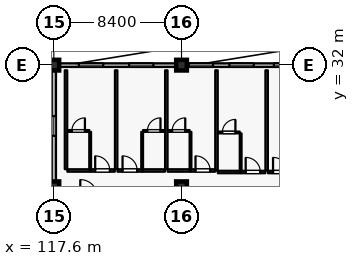
"""IFC4 building model, lengths in metres.
Left out: names, types, materials, properties, quantities, classifications, styles, units other than length and angle.
Written with IfcOpenShell. Run it as: python <this file> out.ifc"""

import sys

from ifc_helpers import new_model, si_unit, direction, frame, frame_2d, origin, origin_2d, place, context, subcontext, project, spatial, rectangle, extrude, element, fill, save


model = new_model("IFC4")
c1 = context("Model", 3, precision=1e-05, world=origin(), true_north=direction((0.0, 1.0)))
c2 = subcontext(c1, "Body", "Model", "MODEL_VIEW")
j1 = project(units=[si_unit("LENGTHUNIT", "METRE"), si_unit("PLANEANGLEUNIT", "RADIAN")], contexts=[c1])
p1 = place(None, origin())
s1 = spatial("IfcSite", under=j1, at=p1, CompositionType="ELEMENT")
p2 = place(p1, origin())
s2 = spatial("IfcBuilding", under=s1, at=p2, CompositionType="ELEMENT")
p3 = place(p2, frame((0.0, 0.0, 28.8)))
s3 = spatial("IfcBuildingStorey", under=s2, at=p3, CompositionType="ELEMENT", Elevation=28.8)
for number, where, z_axis, x_axis in (
    (1, (117.6, 32.0, 0.0), (0.0, 0.0, 1.0), (1.0, 0.0, 0.0)),
    (2, (126.0, 32.0, 0.0), (0.0, 0.0, 1.0), (1.0, 0.0, 0.0)),
    (3, (117.6, 24.0, 0.0), (0.0, 0.0, 1.0), (1.0, 0.0, 0.0)),
    (4, (126.0, 24.0, 0.0), (0.0, 0.0, 1.0), (1.0, 0.0, 0.0)),
):
    element("IfcColumn", number, at=place(p3, frame(where, z_axis=z_axis, x_axis=x_axis)), inside=s3, PredefinedType="COLUMN", context=c2, shape_type="SweptSolid", body=[
        extrude(rectangle(XDim=0.7, YDim=0.7, at=origin_2d()), origin(), (0.0, 0.0, 1.0), 3.6),
    ])
p4 = place(p3, frame((117.95, 32.0, 0.0), z_axis=(0.0, 0.0, 1.0), x_axis=(1.0, 0.0, 0.0)))
e5 = element("IfcWall", 5, at=p4, inside=s3, PredefinedType="SOLIDWALL", context=c2, shape_type="SweptSolid", body=[
    extrude(rectangle(XDim=7.7, YDim=0.24, at=frame_2d((3.85, 0.0))), origin(), (0.0, 0.0, 1.0), 2.93),
])
p5 = place(p4, frame((1.3, 0.0, 0.8)))
e6 = element("IfcOpeningElement", 6, at=p5, cuts=e5, PredefinedType="OPENING", context=c2, shape_type="SweptSolid", body=[
    extrude(rectangle(XDim=1.6, YDim=1.6, at=frame_2d((0.8, 0.8))), frame((0.0, 0.13, 0.0), z_axis=(0.0, -1.0, 0.0), x_axis=(1.0, 0.0, 0.0)), (0.0, 0.0, 1.0), 0.26),
])
p6 = place(p4, frame((4.6, 0.0, 0.8)))
e7 = element("IfcOpeningElement", 7, at=p6, cuts=e5, PredefinedType="OPENING", context=c2, shape_type="SweptSolid", body=[
    extrude(rectangle(XDim=1.6, YDim=1.6, at=frame_2d((0.8, 0.8))), frame((0.0, 0.13, 0.0), z_axis=(0.0, -1.0, 0.0), x_axis=(1.0, 0.0, 0.0)), (0.0, 0.0, 1.0), 0.26),
])
p7 = place(p3, frame((126.35, 32.0, 0.0), z_axis=(0.0, 0.0, 1.0), x_axis=(1.0, 0.0, 0.0)))
e8 = element("IfcWall", 8, at=p7, inside=s3, PredefinedType="SOLIDWALL", context=c2, shape_type="SweptSolid", body=[
    extrude(rectangle(XDim=7.7, YDim=0.24, at=frame_2d((3.85, 0.0))), origin(), (0.0, 0.0, 1.0), 2.93),
])
p8 = place(p7, frame((0.125, 0.0, 0.8)))
e9 = element("IfcOpeningElement", 9, at=p8, cuts=e8, PredefinedType="OPENING", context=c2, shape_type="SweptSolid", body=[
    extrude(rectangle(XDim=1.6, YDim=1.6, at=frame_2d((0.8, 0.8))), frame((0.0, 0.13, 0.0), z_axis=(0.0, -1.0, 0.0), x_axis=(1.0, 0.0, 0.0)), (0.0, 0.0, 1.0), 0.26),
])
p9 = place(p7, frame((2.8, 0.0, 0.8)))
e10 = element("IfcOpeningElement", 10, at=p9, cuts=e8, PredefinedType="OPENING", context=c2, shape_type="SweptSolid", body=[
    extrude(rectangle(XDim=1.6, YDim=1.6, at=frame_2d((0.8, 0.8))), frame((0.0, 0.13, 0.0), z_axis=(0.0, -1.0, 0.0), x_axis=(1.0, 0.0, 0.0)), (0.0, 0.0, 1.0), 0.26),
])
p10 = place(p7, frame((5.725, 0.0, 0.8)))
e11 = element("IfcOpeningElement", 11, at=p10, cuts=e8, PredefinedType="OPENING", context=c2, shape_type="SweptSolid", body=[
    extrude(rectangle(XDim=1.6, YDim=1.6, at=frame_2d((0.8, 0.8))), frame((0.0, 0.13, 0.0), z_axis=(0.0, -1.0, 0.0), x_axis=(1.0, 0.0, 0.0)), (0.0, 0.0, 1.0), 0.26),
])
p11 = place(p3, frame((117.6, 24.35, 0.0), z_axis=(0.0, 0.0, 1.0), x_axis=(0.0, 1.0, 0.0)))
e12 = element("IfcWall", 12, at=p11, inside=s3, PredefinedType="SOLIDWALL", context=c2, shape_type="SweptSolid", body=[
    extrude(rectangle(XDim=7.3, YDim=0.28, at=frame_2d((3.65, 0.0))), origin(), (0.0, 0.0, 1.0), 2.7),
])
p12 = place(p11, frame((3.0, 0.0, 0.5)))
e13 = element("IfcOpeningElement", 13, at=p12, cuts=e12, PredefinedType="OPENING", context=c2, shape_type="SweptSolid", body=[
    extrude(rectangle(XDim=1.3, YDim=1.65, at=frame_2d((0.65, 0.825))), frame((0.0, 0.15, 0.0), z_axis=(0.0, -1.0, 0.0), x_axis=(1.0, 0.0, 0.0)), (0.0, 0.0, 1.0), 0.3),
])
p13 = place(p3, frame((118.49, 25.07, 0.0), z_axis=(0.0, 0.0, 1.0), x_axis=(1.0, 0.0, 0.0)))
e14 = element("IfcWall", 14, at=p13, inside=s3, PredefinedType="PARTITIONING", context=c2, shape_type="SweptSolid", body=[
    extrude(rectangle(XDim=1.49, YDim=0.16, at=frame_2d((0.745, 0.0))), origin(), (0.0, 0.0, 1.0), 3.365),
])
p14 = place(p3, frame((119.99, 25.07, 0.0), z_axis=(0.0, 0.0, 1.0), x_axis=(1.0, 0.0, 0.0)))
e15 = element("IfcWall", 15, at=p14, inside=s3, PredefinedType="PARTITIONING", context=c2, shape_type="SweptSolid", body=[
    extrude(rectangle(XDim=1.62, YDim=0.16, at=frame_2d((0.81, 0.0))), origin(), (0.0, 0.0, 1.0), 3.365),
])
p15 = place(p14, frame((0.33, 0.0, 0.0)))
e16 = element("IfcOpeningElement", 16, at=p15, cuts=e15, PredefinedType="OPENING", context=c2, shape_type="SweptSolid", body=[
    extrude(rectangle(XDim=0.96, YDim=2.2, at=frame_2d((0.48, 1.1))), frame((0.0, 0.09, 0.0), z_axis=(0.0, -1.0, 0.0), x_axis=(1.0, 0.0, 0.0)), (0.0, 0.0, 1.0), 0.18),
])
p16 = place(p3, frame((119.99, 25.16, 0.0), z_axis=(0.0, 0.0, 1.0), x_axis=(0.0, 1.0, 0.0)))
e17 = element("IfcWall", 17, at=p16, inside=s3, PredefinedType="PARTITIONING", context=c2, shape_type="SweptSolid", body=[
    extrude(rectangle(XDim=2.45, YDim=0.115, at=frame_2d((1.225, 0.0))), origin(), (0.0, 0.0, 1.0), 3.365),
])
p17 = place(p3, frame((118.5, 27.67, 0.0), z_axis=(0.0, 0.0, 1.0), x_axis=(1.0, 0.0, 0.0)))
e18 = element("IfcWall", 18, at=p17, inside=s3, PredefinedType="PARTITIONING", context=c2, shape_type="SweptSolid", body=[
    extrude(rectangle(XDim=1.43, YDim=0.115, at=frame_2d((0.715, 0.0))), origin(), (0.0, 0.0, 1.0), 3.365),
])
p18 = place(p17, frame((0.285, 0.0, 0.0)))
e19 = element("IfcOpeningElement", 19, at=p18, cuts=e18, PredefinedType="OPENING", context=c2, shape_type="SweptSolid", body=[
    extrude(rectangle(XDim=0.86, YDim=2.12, at=frame_2d((0.43, 1.06))), frame((0.0, 0.067, 0.0), z_axis=(0.0, -1.0, 0.0), x_axis=(1.0, 0.0, 0.0)), (0.0, 0.0, 1.0), 0.135),
])
p19 = place(p3, frame((118.4, 25.16, 0.0), z_axis=(0.0, 0.0, 1.0), x_axis=(0.0, 1.0, 0.0)))
e20 = element("IfcWall", 20, at=p19, inside=s3, PredefinedType="PARTITIONING", context=c2, shape_type="SweptSolid", body=[
    extrude(rectangle(XDim=6.5, YDim=0.16, at=frame_2d((3.25, 0.0))), origin(), (0.0, 0.0, 1.0), 3.365),
])
p20 = place(p3, frame((121.79, 25.07, 0.0), z_axis=(0.0, 0.0, 1.0), x_axis=(1.0, 0.0, 0.0)))
e21 = element("IfcWall", 21, at=p20, inside=s3, PredefinedType="PARTITIONING", context=c2, shape_type="SweptSolid", body=[
    extrude(rectangle(XDim=1.62, YDim=0.16, at=frame_2d((0.81, 0.0))), origin(), (0.0, 0.0, 1.0), 3.365),
])
p21 = place(p20, frame((0.33, 0.0, 0.0)))
e22 = element("IfcOpeningElement", 22, at=p21, cuts=e21, PredefinedType="OPENING", context=c2, shape_type="SweptSolid", body=[
    extrude(rectangle(XDim=0.96, YDim=2.2, at=frame_2d((0.48, 1.1))), frame((0.0, 0.09, 0.0), z_axis=(0.0, -1.0, 0.0), x_axis=(1.0, 0.0, 0.0)), (0.0, 0.0, 1.0), 0.18),
])
p22 = place(p3, frame((123.42, 25.07, 0.0), z_axis=(0.0, 0.0, 1.0), x_axis=(1.0, 0.0, 0.0)))
e23 = element("IfcWall", 23, at=p22, inside=s3, PredefinedType="PARTITIONING", context=c2, shape_type="SweptSolid", body=[
    extrude(rectangle(XDim=1.49, YDim=0.16, at=frame_2d((0.745, 0.0))), origin(), (0.0, 0.0, 1.0), 3.365),
])
p23 = place(p3, frame((123.41, 25.16, 0.0), z_axis=(0.0, 0.0, 1.0), x_axis=(0.0, 1.0, 0.0)))
e24 = element("IfcWall", 24, at=p23, inside=s3, PredefinedType="PARTITIONING", context=c2, shape_type="SweptSolid", body=[
    extrude(rectangle(XDim=2.45, YDim=0.115, at=frame_2d((1.225, 0.0))), origin(), (0.0, 0.0, 1.0), 3.365),
])
p24 = place(p3, frame((123.47, 27.67, 0.0), z_axis=(0.0, 0.0, 1.0), x_axis=(1.0, 0.0, 0.0)))
e25 = element("IfcWall", 25, at=p24, inside=s3, PredefinedType="PARTITIONING", context=c2, shape_type="SweptSolid", body=[
    extrude(rectangle(XDim=1.43, YDim=0.115, at=frame_2d((0.715, 0.0))), origin(), (0.0, 0.0, 1.0), 3.365),
])
p25 = place(p24, frame((0.285, 0.0, 0.0)))
e26 = element("IfcOpeningElement", 26, at=p25, cuts=e25, PredefinedType="OPENING", context=c2, shape_type="SweptSolid", body=[
    extrude(rectangle(XDim=0.86, YDim=2.12, at=frame_2d((0.43, 1.06))), frame((0.0, 0.067, 0.0), z_axis=(0.0, -1.0, 0.0), x_axis=(1.0, 0.0, 0.0)), (0.0, 0.0, 1.0), 0.135),
])
p26 = place(p3, frame((121.7, 25.16, 0.0), z_axis=(0.0, 0.0, 1.0), x_axis=(0.0, 1.0, 0.0)))
e27 = element("IfcWall", 27, at=p26, inside=s3, PredefinedType="PARTITIONING", context=c2, shape_type="SweptSolid", body=[
    extrude(rectangle(XDim=6.5, YDim=0.16, at=frame_2d((3.25, 0.0))), origin(), (0.0, 0.0, 1.0), 3.365),
])
p27 = place(p3, frame((125.09, 25.07, 0.0), z_axis=(0.0, 0.0, 1.0), x_axis=(1.0, 0.0, 0.0)))
e28 = element("IfcWall", 28, at=p27, inside=s3, PredefinedType="PARTITIONING", context=c2, shape_type="SweptSolid", body=[
    extrude(rectangle(XDim=1.49, YDim=0.16, at=frame_2d((0.745, 0.0))), origin(), (0.0, 0.0, 1.0), 3.365),
])
p28 = place(p3, frame((126.59, 25.07, 0.0), z_axis=(0.0, 0.0, 1.0), x_axis=(1.0, 0.0, 0.0)))
e29 = element("IfcWall", 29, at=p28, inside=s3, PredefinedType="PARTITIONING", context=c2, shape_type="SweptSolid", body=[
    extrude(rectangle(XDim=1.62, YDim=0.16, at=frame_2d((0.81, 0.0))), origin(), (0.0, 0.0, 1.0), 3.365),
])
p29 = place(p28, frame((0.33, 0.0, 0.0)))
e30 = element("IfcOpeningElement", 30, at=p29, cuts=e29, PredefinedType="OPENING", context=c2, shape_type="SweptSolid", body=[
    extrude(rectangle(XDim=0.96, YDim=2.2, at=frame_2d((0.48, 1.1))), frame((0.0, 0.09, 0.0), z_axis=(0.0, -1.0, 0.0), x_axis=(1.0, 0.0, 0.0)), (0.0, 0.0, 1.0), 0.18),
])
p30 = place(p3, frame((126.59, 25.16, 0.0), z_axis=(0.0, 0.0, 1.0), x_axis=(0.0, 1.0, 0.0)))
e31 = element("IfcWall", 31, at=p30, inside=s3, PredefinedType="PARTITIONING", context=c2, shape_type="SweptSolid", body=[
    extrude(rectangle(XDim=2.45, YDim=0.115, at=frame_2d((1.225, 0.0))), origin(), (0.0, 0.0, 1.0), 3.365),
])
p31 = place(p3, frame((125.1, 27.67, 0.0), z_axis=(0.0, 0.0, 1.0), x_axis=(1.0, 0.0, 0.0)))
e32 = element("IfcWall", 32, at=p31, inside=s3, PredefinedType="PARTITIONING", context=c2, shape_type="SweptSolid", body=[
    extrude(rectangle(XDim=1.43, YDim=0.115, at=frame_2d((0.715, 0.0))), origin(), (0.0, 0.0, 1.0), 3.365),
])
p32 = place(p31, frame((0.285, 0.0, 0.0)))
e33 = element("IfcOpeningElement", 33, at=p32, cuts=e32, PredefinedType="OPENING", context=c2, shape_type="SweptSolid", body=[
    extrude(rectangle(XDim=0.86, YDim=2.12, at=frame_2d((0.43, 1.06))), frame((0.0, 0.067, 0.0), z_axis=(0.0, -1.0, 0.0), x_axis=(1.0, 0.0, 0.0)), (0.0, 0.0, 1.0), 0.135),
])
p33 = place(p3, frame((125.0, 25.16, 0.0), z_axis=(0.0, 0.0, 1.0), x_axis=(0.0, 1.0, 0.0)))
e34 = element("IfcWall", 34, at=p33, inside=s3, PredefinedType="PARTITIONING", context=c2, shape_type="SweptSolid", body=[
    extrude(rectangle(XDim=6.5, YDim=0.16, at=frame_2d((3.25, 0.0))), origin(), (0.0, 0.0, 1.0), 3.365),
])
p34 = place(p3, frame((128.39, 24.97, 0.0), z_axis=(0.0, 0.0, 1.0), x_axis=(1.0, 0.0, 0.0)))
e35 = element("IfcWall", 35, at=p34, inside=s3, PredefinedType="PARTITIONING", context=c2, shape_type="SweptSolid", body=[
    extrude(rectangle(XDim=1.49, YDim=0.16, at=frame_2d((0.745, 0.0))), origin(), (0.0, 0.0, 1.0), 3.365),
])
p35 = place(p3, frame((129.89, 24.97, 0.0), z_axis=(0.0, 0.0, 1.0), x_axis=(1.0, 0.0, 0.0)))
e36 = element("IfcWall", 36, at=p35, inside=s3, PredefinedType="PARTITIONING", context=c2, shape_type="SweptSolid", body=[
    extrude(rectangle(XDim=1.62, YDim=0.16, at=frame_2d((0.81, 0.0))), origin(), (0.0, 0.0, 1.0), 3.365),
])
p36 = place(p35, frame((0.33, 0.0, 0.0)))
e37 = element("IfcOpeningElement", 37, at=p36, cuts=e36, PredefinedType="OPENING", context=c2, shape_type="SweptSolid", body=[
    extrude(rectangle(XDim=0.96, YDim=2.2, at=frame_2d((0.48, 1.1))), frame((0.0, 0.09, 0.0), z_axis=(0.0, -1.0, 0.0), x_axis=(1.0, 0.0, 0.0)), (0.0, 0.0, 1.0), 0.18),
])
p37 = place(p3, frame((129.89, 25.06, 0.0), z_axis=(0.0, 0.0, 1.0), x_axis=(0.0, 1.0, 0.0)))
e38 = element("IfcWall", 38, at=p37, inside=s3, PredefinedType="PARTITIONING", context=c2, shape_type="SweptSolid", body=[
    extrude(rectangle(XDim=2.45, YDim=0.115, at=frame_2d((1.225, 0.0))), origin(), (0.0, 0.0, 1.0), 3.365),
])
p38 = place(p3, frame((128.4, 27.57, 0.0), z_axis=(0.0, 0.0, 1.0), x_axis=(1.0, 0.0, 0.0)))
e39 = element("IfcWall", 39, at=p38, inside=s3, PredefinedType="PARTITIONING", context=c2, shape_type="SweptSolid", body=[
    extrude(rectangle(XDim=1.43, YDim=0.115, at=frame_2d((0.715, 0.0))), origin(), (0.0, 0.0, 1.0), 3.365),
])
p39 = place(p38, frame((0.285, 0.0, 0.0)))
e40 = element("IfcOpeningElement", 40, at=p39, cuts=e39, PredefinedType="OPENING", context=c2, shape_type="SweptSolid", body=[
    extrude(rectangle(XDim=0.86, YDim=2.12, at=frame_2d((0.43, 1.06))), frame((0.0, 0.067, 0.0), z_axis=(0.0, -1.0, 0.0), x_axis=(1.0, 0.0, 0.0)), (0.0, 0.0, 1.0), 0.135),
])
p40 = place(p3, frame((128.3, 25.06, 0.0), z_axis=(0.0, 0.0, 1.0), x_axis=(0.0, 1.0, 0.0)))
e41 = element("IfcWall", 41, at=p40, inside=s3, PredefinedType="PARTITIONING", context=c2, shape_type="SweptSolid", body=[
    extrude(rectangle(XDim=6.6, YDim=0.16, at=frame_2d((3.3, 0.0))), origin(), (0.0, 0.0, 1.0), 3.365),
])
p41 = place(p3, frame((131.69, 24.97, 0.0), z_axis=(0.0, 0.0, 1.0), x_axis=(1.0, 0.0, 0.0)))
e42 = element("IfcWall", 42, at=p41, inside=s3, PredefinedType="PARTITIONING", context=c2, shape_type="SweptSolid", body=[
    extrude(rectangle(XDim=1.62, YDim=0.16, at=frame_2d((0.81, 0.0))), origin(), (0.0, 0.0, 1.0), 3.365),
])
p42 = place(p41, frame((0.33, 0.0, 0.0)))
e43 = element("IfcOpeningElement", 43, at=p42, cuts=e42, PredefinedType="OPENING", context=c2, shape_type="SweptSolid", body=[
    extrude(rectangle(XDim=0.96, YDim=2.2, at=frame_2d((0.48, 1.1))), frame((0.0, 0.09, 0.0), z_axis=(0.0, -1.0, 0.0), x_axis=(1.0, 0.0, 0.0)), (0.0, 0.0, 1.0), 0.18),
])
p43 = place(p3, frame((131.6, 25.06, 0.0), z_axis=(0.0, 0.0, 1.0), x_axis=(0.0, 1.0, 0.0)))
e44 = element("IfcWall", 44, at=p43, inside=s3, PredefinedType="PARTITIONING", context=c2, shape_type="SweptSolid", body=[
    extrude(rectangle(XDim=6.6, YDim=0.16, at=frame_2d((3.3, 0.0))), origin(), (0.0, 0.0, 1.0), 3.365),
])
p44 = place(p5, origin())
e45 = element("IfcWindow", 45, at=p44, inside=s3, PartitioningType="SINGLE_PANEL", PredefinedType="WINDOW", context=c2, shape_type="SweptSolid", body=[
    extrude(rectangle(XDim=1.6, YDim=1.6, at=frame_2d((0.8, 0.8))), frame((0.0, 0.03, 0.0), z_axis=(0.0, -1.0, 0.0), x_axis=(1.0, 0.0, 0.0)), (0.0, 0.0, 1.0), 0.06),
])
fill(e6, e45)
p45 = place(p6, origin())
e46 = element("IfcWindow", 46, at=p45, inside=s3, PartitioningType="SINGLE_PANEL", PredefinedType="WINDOW", context=c2, shape_type="SweptSolid", body=[
    extrude(rectangle(XDim=1.6, YDim=1.6, at=frame_2d((0.8, 0.8))), frame((0.0, 0.03, 0.0), z_axis=(0.0, -1.0, 0.0), x_axis=(1.0, 0.0, 0.0)), (0.0, 0.0, 1.0), 0.06),
])
fill(e7, e46)
p46 = place(p8, origin())
e47 = element("IfcWindow", 47, at=p46, inside=s3, PartitioningType="SINGLE_PANEL", PredefinedType="WINDOW", context=c2, shape_type="SweptSolid", body=[
    extrude(rectangle(XDim=1.6, YDim=1.6, at=frame_2d((0.8, 0.8))), frame((0.0, 0.03, 0.0), z_axis=(0.0, -1.0, 0.0), x_axis=(1.0, 0.0, 0.0)), (0.0, 0.0, 1.0), 0.06),
])
fill(e9, e47)
p47 = place(p9, origin())
e48 = element("IfcWindow", 48, at=p47, inside=s3, PartitioningType="SINGLE_PANEL", PredefinedType="WINDOW", context=c2, shape_type="SweptSolid", body=[
    extrude(rectangle(XDim=1.6, YDim=1.6, at=frame_2d((0.8, 0.8))), frame((0.0, 0.03, 0.0), z_axis=(0.0, -1.0, 0.0), x_axis=(1.0, 0.0, 0.0)), (0.0, 0.0, 1.0), 0.06),
])
fill(e10, e48)
p48 = place(p10, origin())
e49 = element("IfcWindow", 49, at=p48, inside=s3, PartitioningType="SINGLE_PANEL", PredefinedType="WINDOW", context=c2, shape_type="SweptSolid", body=[
    extrude(rectangle(XDim=1.6, YDim=1.6, at=frame_2d((0.8, 0.8))), frame((0.0, 0.03, 0.0), z_axis=(0.0, -1.0, 0.0), x_axis=(1.0, 0.0, 0.0)), (0.0, 0.0, 1.0), 0.06),
])
fill(e11, e49)
p49 = place(p12, origin())
e50 = element("IfcWindow", 50, at=p49, inside=s3, PartitioningType="SINGLE_PANEL", PredefinedType="WINDOW", context=c2, shape_type="SweptSolid", body=[
    extrude(rectangle(XDim=1.3, YDim=1.65, at=frame_2d((0.65, 0.825))), frame((0.0, 0.03, 0.0), z_axis=(0.0, -1.0, 0.0), x_axis=(1.0, 0.0, 0.0)), (0.0, 0.0, 1.0), 0.06),
])
fill(e13, e50)
p50 = place(p15, origin())
e51 = element("IfcDoor", 51, at=p50, inside=s3, OperationType="SINGLE_SWING_LEFT", PredefinedType="DOOR", context=c2, shape_type="SweptSolid", body=[
    extrude(rectangle(XDim=0.96, YDim=2.2, at=frame_2d((0.48, 1.1))), frame((0.0, 0.025, 0.0), z_axis=(0.0, -1.0, 0.0), x_axis=(1.0, 0.0, 0.0)), (0.0, 0.0, 1.0), 0.05),
])
fill(e16, e51)
p51 = place(p18, origin())
e52 = element("IfcDoor", 52, at=p51, inside=s3, OperationType="SINGLE_SWING_RIGHT", PredefinedType="DOOR", context=c2, shape_type="SweptSolid", body=[
    extrude(rectangle(XDim=0.86, YDim=2.12, at=frame_2d((0.43, 1.06))), frame((0.0, 0.025, 0.0), z_axis=(0.0, -1.0, 0.0), x_axis=(1.0, 0.0, 0.0)), (0.0, 0.0, 1.0), 0.05),
])
fill(e19, e52)
p52 = place(p21, origin())
e53 = element("IfcDoor", 53, at=p52, inside=s3, OperationType="SINGLE_SWING_LEFT", PredefinedType="DOOR", context=c2, shape_type="SweptSolid", body=[
    extrude(rectangle(XDim=0.96, YDim=2.2, at=frame_2d((0.48, 1.1))), frame((0.0, 0.025, 0.0), z_axis=(0.0, -1.0, 0.0), x_axis=(1.0, 0.0, 0.0)), (0.0, 0.0, 1.0), 0.05),
])
fill(e22, e53)
p53 = place(p25, origin())
e54 = element("IfcDoor", 54, at=p53, inside=s3, OperationType="SINGLE_SWING_RIGHT", PredefinedType="DOOR", context=c2, shape_type="SweptSolid", body=[
    extrude(rectangle(XDim=0.86, YDim=2.12, at=frame_2d((0.43, 1.06))), frame((0.0, 0.025, 0.0), z_axis=(0.0, -1.0, 0.0), x_axis=(1.0, 0.0, 0.0)), (0.0, 0.0, 1.0), 0.05),
])
fill(e26, e54)
p54 = place(p29, origin())
e55 = element("IfcDoor", 55, at=p54, inside=s3, OperationType="SINGLE_SWING_LEFT", PredefinedType="DOOR", context=c2, shape_type="SweptSolid", body=[
    extrude(rectangle(XDim=0.96, YDim=2.2, at=frame_2d((0.48, 1.1))), frame((0.0, 0.025, 0.0), z_axis=(0.0, -1.0, 0.0), x_axis=(1.0, 0.0, 0.0)), (0.0, 0.0, 1.0), 0.05),
])
fill(e30, e55)
p55 = place(p32, origin())
e56 = element("IfcDoor", 56, at=p55, inside=s3, OperationType="SINGLE_SWING_RIGHT", PredefinedType="DOOR", context=c2, shape_type="SweptSolid", body=[
    extrude(rectangle(XDim=0.86, YDim=2.12, at=frame_2d((0.43, 1.06))), frame((0.0, 0.025, 0.0), z_axis=(0.0, -1.0, 0.0), x_axis=(1.0, 0.0, 0.0)), (0.0, 0.0, 1.0), 0.05),
])
fill(e33, e56)
p56 = place(p36, origin())
e57 = element("IfcDoor", 57, at=p56, inside=s3, OperationType="SINGLE_SWING_LEFT", PredefinedType="DOOR", context=c2, shape_type="SweptSolid", body=[
    extrude(rectangle(XDim=0.96, YDim=2.2, at=frame_2d((0.48, 1.1))), frame((0.0, 0.025, 0.0), z_axis=(0.0, -1.0, 0.0), x_axis=(1.0, 0.0, 0.0)), (0.0, 0.0, 1.0), 0.05),
])
fill(e37, e57)
p57 = place(p39, origin())
e58 = element("IfcDoor", 58, at=p57, inside=s3, OperationType="SINGLE_SWING_RIGHT", PredefinedType="DOOR", context=c2, shape_type="SweptSolid", body=[
    extrude(rectangle(XDim=0.86, YDim=2.12, at=frame_2d((0.43, 1.06))), frame((0.0, 0.025, 0.0), z_axis=(0.0, -1.0, 0.0), x_axis=(1.0, 0.0, 0.0)), (0.0, 0.0, 1.0), 0.05),
])
fill(e40, e58)
p58 = place(p42, origin())
e59 = element("IfcDoor", 59, at=p58, inside=s3, OperationType="SINGLE_SWING_LEFT", PredefinedType="DOOR", context=c2, shape_type="SweptSolid", body=[
    extrude(rectangle(XDim=0.96, YDim=2.2, at=frame_2d((0.48, 1.1))), frame((0.0, 0.025, 0.0), z_axis=(0.0, -1.0, 0.0), x_axis=(1.0, 0.0, 0.0)), (0.0, 0.0, 1.0), 0.05),
])
fill(e43, e59)
save(model, sys.argv[1])
